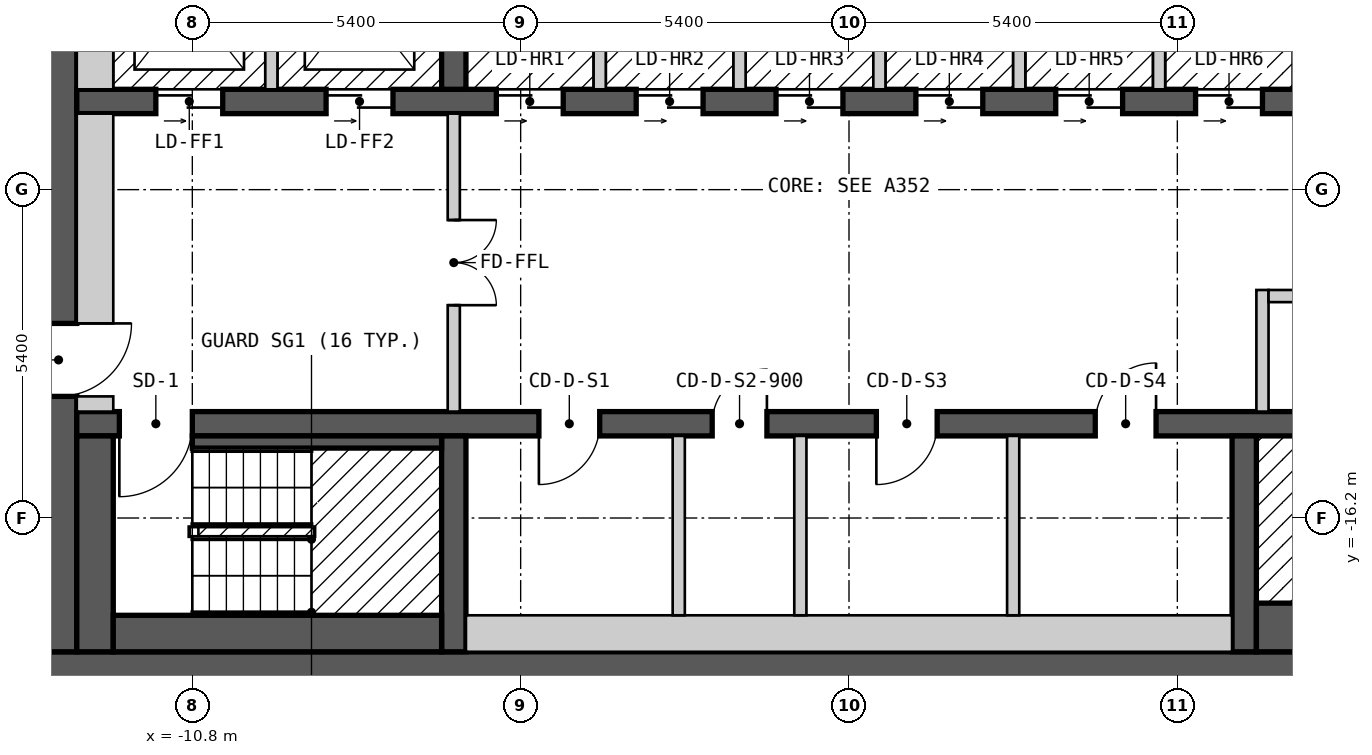
"""IFC4 building model, lengths in metres.
Left out: names, types, materials, properties, quantities, classifications, styles, units other than length and angle.
Written with IfcOpenShell. Run it as: python <this file> out.ifc"""

import sys

from ifc_helpers import new_model, si_unit, direction, frame, frame_2d, origin, place, context, subcontext, project, spatial, rectangle, extrude, element, fill, save


model = new_model("IFC4")
c1 = context("Model", 3, precision=1e-05, world=origin(), true_north=direction((0.0, 1.0)))
c2 = subcontext(c1, "Body", "Model", "MODEL_VIEW")
j1 = project(units=[si_unit("LENGTHUNIT", "METRE"), si_unit("PLANEANGLEUNIT", "RADIAN")], contexts=[c1])
p1 = place(None, origin())
s1 = spatial("IfcSite", under=j1, at=p1, CompositionType="ELEMENT")
p2 = place(p1, origin())
s2 = spatial("IfcBuilding", under=s1, at=p2, CompositionType="ELEMENT")
p3 = place(p2, frame((0.0, 0.0, 190.2)))
s3 = spatial("IfcBuildingStorey", under=s2, at=p3, CompositionType="ELEMENT", Elevation=190.2)
p4 = place(p3, frame((-13.3, -18.7, 0.0), z_axis=(0.0, 0.0, 1.0), x_axis=(1.0, 0.0, 0.0)))
e1 = element("IfcWall", 1, at=p4, inside=s3, PredefinedType="SHEAR", context=c2, shape_type="SweptSolid", body=[
    extrude(rectangle(XDim=26.6, YDim=0.6, at=frame_2d((13.3, 0.0))), origin(), (0.0, 0.0, 1.0), 2.7),
])
p5 = place(p3, frame((-13.0, -18.4, 0.0), z_axis=(0.0, 0.0, 1.0), x_axis=(0.0, 1.0, 0.0)))
e2 = element("IfcWall", 2, at=p5, inside=s3, PredefinedType="SHEAR", context=c2, shape_type="SweptSolid", body=[
    extrude(rectangle(XDim=12.8, YDim=0.6, at=frame_2d((6.4, 0.0))), origin(), (0.0, 0.0, 1.0), 2.7),
])
p6 = place(p5, frame((4.2, 0.0, 0.0)))
e3 = element("IfcOpeningElement", 3, at=p6, cuts=e2, PredefinedType="OPENING", context=c2, shape_type="SweptSolid", body=[
    extrude(rectangle(XDim=1.2, YDim=2.1, at=frame_2d((0.6, 1.05))), frame((0.0, 0.31, 0.0), z_axis=(0.0, -1.0, 0.0), x_axis=(1.0, 0.0, 0.0)), (0.0, 0.0, 1.0), 0.62),
])
p7 = place(p3, frame((-12.7, -14.65, 0.0), z_axis=(0.0, 0.0, 1.0), x_axis=(1.0, 0.0, 0.0)))
e4 = element("IfcWall", 4, at=p7, inside=s3, PredefinedType="SHEAR", context=c2, shape_type="SweptSolid", body=[
    extrude(rectangle(XDim=25.4, YDim=0.4, at=frame_2d((12.7, 0.0))), origin(), (0.0, 0.0, 1.0), 2.7),
])
p8 = place(p7, frame((1.9, 0.0, 0.0), z_axis=(0.0, 0.0, 1.0), x_axis=(-1.0, 0.0, 0.0)))
e5 = element("IfcOpeningElement", 5, at=p8, cuts=e4, PredefinedType="OPENING", context=c2, shape_type="SweptSolid", body=[
    extrude(rectangle(XDim=1.2, YDim=2.1, at=frame_2d((0.6, 1.05))), frame((0.0, 0.21, 0.0), z_axis=(0.0, -1.0, 0.0), x_axis=(1.0, 0.0, 0.0)), (0.0, 0.0, 1.0), 0.42),
])
p9 = place(p7, frame((24.75, 0.0, 0.0), z_axis=(0.0, 0.0, 1.0), x_axis=(-1.0, 0.0, 0.0)))
e6 = element("IfcOpeningElement", 6, at=p9, cuts=e4, PredefinedType="OPENING", context=c2, shape_type="SweptSolid", body=[
    extrude(rectangle(XDim=1.2, YDim=2.1, at=frame_2d((0.6, 1.05))), frame((0.0, 0.21, 0.0), z_axis=(0.0, -1.0, 0.0), x_axis=(1.0, 0.0, 0.0)), (0.0, 0.0, 1.0), 0.42),
])
p10 = place(p7, frame((8.6, 0.0, 0.0), z_axis=(0.0, 0.0, 1.0), x_axis=(-1.0, 0.0, 0.0)))
e7 = element("IfcOpeningElement", 7, at=p10, cuts=e4, PredefinedType="OPENING", context=c2, shape_type="SweptSolid", body=[
    extrude(rectangle(XDim=1.0, YDim=2.1, at=frame_2d((0.5, 1.05))), frame((0.0, 0.21, 0.0), z_axis=(0.0, -1.0, 0.0), x_axis=(1.0, 0.0, 0.0)), (0.0, 0.0, 1.0), 0.42),
])
p11 = place(p7, frame((11.35, 0.0, 0.0), z_axis=(0.0, 0.0, 1.0), x_axis=(-1.0, 0.0, 0.0)))
e8 = element("IfcOpeningElement", 8, at=p11, cuts=e4, PredefinedType="OPENING", context=c2, shape_type="SweptSolid", body=[
    extrude(rectangle(XDim=0.9, YDim=2.1, at=frame_2d((0.45, 1.05))), frame((0.0, 0.21, 0.0), z_axis=(0.0, -1.0, 0.0), x_axis=(1.0, 0.0, 0.0)), (0.0, 0.0, 1.0), 0.42),
])
p12 = place(p7, frame((14.15, 0.0, 0.0), z_axis=(0.0, 0.0, 1.0), x_axis=(-1.0, 0.0, 0.0)))
e9 = element("IfcOpeningElement", 9, at=p12, cuts=e4, PredefinedType="OPENING", context=c2, shape_type="SweptSolid", body=[
    extrude(rectangle(XDim=1.0, YDim=2.1, at=frame_2d((0.5, 1.05))), frame((0.0, 0.21, 0.0), z_axis=(0.0, -1.0, 0.0), x_axis=(1.0, 0.0, 0.0)), (0.0, 0.0, 1.0), 0.42),
])
p13 = place(p7, frame((17.75, 0.0, 0.0), z_axis=(0.0, 0.0, 1.0), x_axis=(-1.0, 0.0, 0.0)))
e10 = element("IfcOpeningElement", 10, at=p13, cuts=e4, PredefinedType="OPENING", context=c2, shape_type="SweptSolid", body=[
    extrude(rectangle(XDim=1.0, YDim=2.1, at=frame_2d((0.5, 1.05))), frame((0.0, 0.21, 0.0), z_axis=(0.0, -1.0, 0.0), x_axis=(1.0, 0.0, 0.0)), (0.0, 0.0, 1.0), 0.42),
])
p14 = place(p3, frame((-12.7, -9.35, 0.0), z_axis=(0.0, 0.0, 1.0), x_axis=(1.0, 0.0, 0.0)))
e11 = element("IfcWall", 11, at=p14, inside=s3, PredefinedType="SHEAR", context=c2, shape_type="SweptSolid", body=[
    extrude(rectangle(XDim=22.9, YDim=0.4, at=frame_2d((11.45, 0.0))), origin(), (0.0, 0.0, 1.0), 2.7),
])
p15 = place(p14, frame((1.3, 0.0, 0.0)))
e12 = element("IfcOpeningElement", 12, at=p15, cuts=e11, PredefinedType="OPENING", context=c2, shape_type="SweptSolid", body=[
    extrude(rectangle(XDim=1.1, YDim=2.1, at=frame_2d((0.55, 1.05))), frame((0.0, 0.21, 0.0), z_axis=(0.0, -1.0, 0.0), x_axis=(1.0, 0.0, 0.0)), (0.0, 0.0, 1.0), 0.42),
])
p16 = place(p14, frame((4.1, 0.0, 0.0)))
e13 = element("IfcOpeningElement", 13, at=p16, cuts=e11, PredefinedType="OPENING", context=c2, shape_type="SweptSolid", body=[
    extrude(rectangle(XDim=1.1, YDim=2.1, at=frame_2d((0.55, 1.05))), frame((0.0, 0.21, 0.0), z_axis=(0.0, -1.0, 0.0), x_axis=(1.0, 0.0, 0.0)), (0.0, 0.0, 1.0), 0.42),
])
p17 = place(p14, frame((6.9, 0.0, 0.0)))
e14 = element("IfcOpeningElement", 14, at=p17, cuts=e11, PredefinedType="OPENING", context=c2, shape_type="SweptSolid", body=[
    extrude(rectangle(XDim=1.1, YDim=2.1, at=frame_2d((0.55, 1.05))), frame((0.0, 0.21, 0.0), z_axis=(0.0, -1.0, 0.0), x_axis=(1.0, 0.0, 0.0)), (0.0, 0.0, 1.0), 0.42),
])
p18 = place(p14, frame((9.2, 0.0, 0.0)))
e15 = element("IfcOpeningElement", 15, at=p18, cuts=e11, PredefinedType="OPENING", context=c2, shape_type="SweptSolid", body=[
    extrude(rectangle(XDim=1.1, YDim=2.1, at=frame_2d((0.55, 1.05))), frame((0.0, 0.21, 0.0), z_axis=(0.0, -1.0, 0.0), x_axis=(1.0, 0.0, 0.0)), (0.0, 0.0, 1.0), 0.42),
])
p19 = place(p14, frame((11.5, 0.0, 0.0)))
e16 = element("IfcOpeningElement", 16, at=p19, cuts=e11, PredefinedType="OPENING", context=c2, shape_type="SweptSolid", body=[
    extrude(rectangle(XDim=1.1, YDim=2.1, at=frame_2d((0.55, 1.05))), frame((0.0, 0.21, 0.0), z_axis=(0.0, -1.0, 0.0), x_axis=(1.0, 0.0, 0.0)), (0.0, 0.0, 1.0), 0.42),
])
p20 = place(p14, frame((13.8, 0.0, 0.0)))
e17 = element("IfcOpeningElement", 17, at=p20, cuts=e11, PredefinedType="OPENING", context=c2, shape_type="SweptSolid", body=[
    extrude(rectangle(XDim=1.1, YDim=2.1, at=frame_2d((0.55, 1.05))), frame((0.0, 0.21, 0.0), z_axis=(0.0, -1.0, 0.0), x_axis=(1.0, 0.0, 0.0)), (0.0, 0.0, 1.0), 0.42),
])
p21 = place(p14, frame((16.1, 0.0, 0.0)))
e18 = element("IfcOpeningElement", 18, at=p21, cuts=e11, PredefinedType="OPENING", context=c2, shape_type="SweptSolid", body=[
    extrude(rectangle(XDim=1.1, YDim=2.1, at=frame_2d((0.55, 1.05))), frame((0.0, 0.21, 0.0), z_axis=(0.0, -1.0, 0.0), x_axis=(1.0, 0.0, 0.0)), (0.0, 0.0, 1.0), 0.42),
])
p22 = place(p14, frame((18.4, 0.0, 0.0)))
e19 = element("IfcOpeningElement", 19, at=p22, cuts=e11, PredefinedType="OPENING", context=c2, shape_type="SweptSolid", body=[
    extrude(rectangle(XDim=1.1, YDim=2.1, at=frame_2d((0.55, 1.05))), frame((0.0, 0.21, 0.0), z_axis=(0.0, -1.0, 0.0), x_axis=(1.0, 0.0, 0.0)), (0.0, 0.0, 1.0), 0.42),
])
p23 = place(p14, frame((20.8, 0.0, 0.0)))
e20 = element("IfcOpeningElement", 20, at=p23, cuts=e11, PredefinedType="OPENING", context=c2, shape_type="SweptSolid", body=[
    extrude(rectangle(XDim=1.1, YDim=2.1, at=frame_2d((0.55, 1.05))), frame((0.0, 0.21, 0.0), z_axis=(0.0, -1.0, 0.0), x_axis=(1.0, 0.0, 0.0)), (0.0, 0.0, 1.0), 0.42),
])
for number, where, z_axis, x_axis in (
    (21, (-6.5, -18.4, 0.0), (0.0, 0.0, 1.0), (0.0, 1.0, 0.0)),
    (22, (6.5, -18.4, 0.0), (0.0, 0.0, 1.0), (0.0, 1.0, 0.0)),
    (23, (-6.5, -9.15, 0.0), (0.0, 0.0, 1.0), (0.0, 1.0, 0.0)),
):
    element("IfcWall", number, at=place(p3, frame(where, z_axis=z_axis, x_axis=x_axis)), inside=s3, PredefinedType="SHEAR", context=c2, shape_type="SweptSolid", body=[
        extrude(rectangle(XDim=3.55, YDim=0.4, at=frame_2d((1.775, 0.0))), origin(), (0.0, 0.0, 1.0), 2.7),
    ])
p24 = place(p3, frame((-12.4, -18.4, 0.0), z_axis=(0.0, 0.0, 1.0), x_axis=(0.0, 1.0, 0.0)))
e24 = element("IfcWall", 24, at=p24, inside=s3, PredefinedType="SOLIDWALL", context=c2, shape_type="SweptSolid", body=[
    extrude(rectangle(XDim=3.55, YDim=0.6, at=frame_2d((1.775, 0.0))), origin(), (0.0, 0.0, 1.0), 2.7),
])
p25 = place(p3, frame((-12.7, -14.325, 0.0), z_axis=(0.0, 0.0, 1.0), x_axis=(1.0, 0.0, 0.0)))
e25 = element("IfcWall", 25, at=p25, inside=s3, PredefinedType="PARTITIONING", context=c2, shape_type="SweptSolid", body=[
    extrude(rectangle(XDim=0.6, YDim=0.25, at=frame_2d((0.3, 0.0))), origin(), (0.0, 0.0, 1.0), 2.7),
])
p26 = place(p3, frame((-12.4, -13.0, 0.0), z_axis=(0.0, 0.0, 1.0), x_axis=(0.0, 1.0, 0.0)))
e26 = element("IfcWall", 26, at=p26, inside=s3, PredefinedType="PARTITIONING", context=c2, shape_type="SweptSolid", body=[
    extrude(rectangle(XDim=3.45, YDim=0.6, at=frame_2d((1.725, 0.0))), origin(), (0.0, 0.0, 1.0), 2.7),
])
p27 = place(p3, frame((-12.4, -9.15, 0.0), z_axis=(0.0, 0.0, 1.0), x_axis=(0.0, 1.0, 0.0)))
e27 = element("IfcWall", 27, at=p27, inside=s3, PredefinedType="SOLIDWALL", context=c2, shape_type="SweptSolid", body=[
    extrude(rectangle(XDim=3.55, YDim=0.6, at=frame_2d((1.775, 0.0))), origin(), (0.0, 0.0, 1.0), 2.7),
])
p28 = place(p3, frame((-12.1, -18.1, 0.0), z_axis=(0.0, 0.0, 1.0), x_axis=(1.0, 0.0, 0.0)))
e28 = element("IfcWall", 28, at=p28, inside=s3, PredefinedType="SOLIDWALL", context=c2, shape_type="SweptSolid", body=[
    extrude(rectangle(XDim=5.4, YDim=0.6, at=frame_2d((2.7, 0.0))), origin(), (0.0, 0.0, 1.0), 2.7),
])
p29 = place(p3, frame((-10.8, -14.95, 0.0), z_axis=(0.0, 0.0, 1.0), x_axis=(1.0, 0.0, 0.0)))
e29 = element("IfcWall", 29, at=p29, inside=s3, PredefinedType="SOLIDWALL", context=c2, shape_type="SweptSolid", body=[
    extrude(rectangle(XDim=4.1, YDim=0.2, at=frame_2d((2.05, 0.0))), origin(), (0.0, 0.0, 1.0), 2.7),
])
p30 = place(p3, frame((-9.5, -9.15, 0.0), z_axis=(0.0, 0.0, 1.0), x_axis=(0.0, 1.0, 0.0)))
e30 = element("IfcWall", 30, at=p30, inside=s3, PredefinedType="SOLIDWALL", context=c2, shape_type="SweptSolid", body=[
    extrude(rectangle(XDim=2.95, YDim=0.2, at=frame_2d((1.475, 0.0))), origin(), (0.0, 0.0, 1.0), 2.7),
])
p31 = place(p3, frame((-6.5, -14.45, 0.0), z_axis=(0.0, 0.0, 1.0), x_axis=(0.0, 1.0, 0.0)))
e31 = element("IfcWall", 31, at=p31, inside=s3, PredefinedType="PARTITIONING", context=c2, shape_type="SweptSolid", body=[
    extrude(rectangle(XDim=4.9, YDim=0.2, at=frame_2d((2.45, 0.0))), origin(), (0.0, 0.0, 1.0), 2.7),
])
p32 = place(p31, frame((3.15, 0.0, 0.0), z_axis=(0.0, 0.0, 1.0), x_axis=(-1.0, 0.0, 0.0)))
e32 = element("IfcOpeningElement", 32, at=p32, cuts=e31, PredefinedType="OPENING", context=c2, shape_type="SweptSolid", body=[
    extrude(rectangle(XDim=1.4, YDim=2.1, at=frame_2d((0.7, 1.05))), frame((0.0, 0.11, 0.0), z_axis=(0.0, -1.0, 0.0), x_axis=(1.0, 0.0, 0.0)), (0.0, 0.0, 1.0), 0.22),
])
p33 = place(p3, frame((-6.3, -18.1, 0.0), z_axis=(0.0, 0.0, 1.0), x_axis=(1.0, 0.0, 0.0)))
e33 = element("IfcWall", 33, at=p33, inside=s3, PredefinedType="PARTITIONING", context=c2, shape_type="SweptSolid", body=[
    extrude(rectangle(XDim=12.6, YDim=0.6, at=frame_2d((6.3, 0.0))), origin(), (0.0, 0.0, 1.0), 2.7),
])
p34 = place(p3, frame((-4.1, -9.15, 0.0), z_axis=(0.0, 0.0, 1.0), x_axis=(0.0, 1.0, 0.0)))
e34 = element("IfcWall", 34, at=p34, inside=s3, PredefinedType="SOLIDWALL", context=c2, shape_type="SweptSolid", body=[
    extrude(rectangle(XDim=2.95, YDim=0.2, at=frame_2d((1.475, 0.0))), origin(), (0.0, 0.0, 1.0), 2.7),
])
p35 = place(p3, frame((-2.8, -17.8, 0.0), z_axis=(0.0, 0.0, 1.0), x_axis=(0.0, 1.0, 0.0)))
e35 = element("IfcWall", 35, at=p35, inside=s3, PredefinedType="PARTITIONING", context=c2, shape_type="SweptSolid", body=[
    extrude(rectangle(XDim=2.95, YDim=0.2, at=frame_2d((1.475, 0.0))), origin(), (0.0, 0.0, 1.0), 2.7),
])
p36 = place(p3, frame((-1.8, -9.15, 0.0), z_axis=(0.0, 0.0, 1.0), x_axis=(0.0, 1.0, 0.0)))
e36 = element("IfcWall", 36, at=p36, inside=s3, PredefinedType="SOLIDWALL", context=c2, shape_type="SweptSolid", body=[
    extrude(rectangle(XDim=2.95, YDim=0.2, at=frame_2d((1.475, 0.0))), origin(), (0.0, 0.0, 1.0), 2.7),
])
p37 = place(p3, frame((-0.8, -17.8, 0.0), z_axis=(0.0, 0.0, 1.0), x_axis=(0.0, 1.0, 0.0)))
e37 = element("IfcWall", 37, at=p37, inside=s3, PredefinedType="PARTITIONING", context=c2, shape_type="SweptSolid", body=[
    extrude(rectangle(XDim=2.95, YDim=0.2, at=frame_2d((1.475, 0.0))), origin(), (0.0, 0.0, 1.0), 2.7),
])
p38 = place(p3, frame((0.5, -9.15, 0.0), z_axis=(0.0, 0.0, 1.0), x_axis=(0.0, 1.0, 0.0)))
e38 = element("IfcWall", 38, at=p38, inside=s3, PredefinedType="SOLIDWALL", context=c2, shape_type="SweptSolid", body=[
    extrude(rectangle(XDim=2.95, YDim=0.2, at=frame_2d((1.475, 0.0))), origin(), (0.0, 0.0, 1.0), 2.7),
])
p39 = place(p3, frame((2.7, -17.8, 0.0), z_axis=(0.0, 0.0, 1.0), x_axis=(0.0, 1.0, 0.0)))
e39 = element("IfcWall", 39, at=p39, inside=s3, PredefinedType="PARTITIONING", context=c2, shape_type="SweptSolid", body=[
    extrude(rectangle(XDim=2.95, YDim=0.2, at=frame_2d((1.475, 0.0))), origin(), (0.0, 0.0, 1.0), 2.7),
])
for number, where, z_axis, x_axis in (
    (40, (2.8, -9.15, 0.0), (0.0, 0.0, 1.0), (0.0, 1.0, 0.0)),
    (41, (5.1, -9.15, 0.0), (0.0, 0.0, 1.0), (0.0, 1.0, 0.0)),
):
    element("IfcWall", number, at=place(p3, frame(where, z_axis=z_axis, x_axis=x_axis)), inside=s3, PredefinedType="SOLIDWALL", context=c2, shape_type="SweptSolid", body=[
        extrude(rectangle(XDim=2.95, YDim=0.2, at=frame_2d((1.475, 0.0))), origin(), (0.0, 0.0, 1.0), 2.7),
    ])
p40 = place(p3, frame((6.7, -18.0, 0.0), z_axis=(0.0, 0.0, 1.0), x_axis=(1.0, 0.0, 0.0)))
e42 = element("IfcWall", 42, at=p40, inside=s3, PredefinedType="SOLIDWALL", context=c2, shape_type="SweptSolid", body=[
    extrude(rectangle(XDim=6.0, YDim=0.8, at=frame_2d((3.0, 0.0))), origin(), (0.0, 0.0, 1.0), 2.7),
])
p41 = place(p3, frame((6.8, -14.45, 0.0), z_axis=(0.0, 0.0, 1.0), x_axis=(0.0, 1.0, 0.0)))
e43 = element("IfcWall", 43, at=p41, inside=s3, PredefinedType="PARTITIONING", context=c2, shape_type="SweptSolid", body=[
    extrude(rectangle(XDim=2.0, YDim=0.2, at=frame_2d((1.0, 0.0))), origin(), (0.0, 0.0, 1.0), 2.7),
])
p42 = place(p3, frame((6.9, -12.55, 0.0), z_axis=(0.0, 0.0, 1.0), x_axis=(1.0, 0.0, 0.0)))
e44 = element("IfcWall", 44, at=p42, inside=s3, PredefinedType="PARTITIONING", context=c2, shape_type="SweptSolid", body=[
    extrude(rectangle(XDim=3.3, YDim=0.2, at=frame_2d((1.65, 0.0))), origin(), (0.0, 0.0, 1.0), 2.7),
])
p43 = place(p42, frame((2.05, 0.0, 0.0), z_axis=(0.0, 0.0, 1.0), x_axis=(-1.0, 0.0, 0.0)))
e45 = element("IfcOpeningElement", 45, at=p43, cuts=e44, PredefinedType="OPENING", context=c2, shape_type="SweptSolid", body=[
    extrude(rectangle(XDim=1.0, YDim=2.1, at=frame_2d((0.5, 1.05))), frame((0.0, 0.11, 0.0), z_axis=(0.0, -1.0, 0.0), x_axis=(1.0, 0.0, 0.0)), (0.0, 0.0, 1.0), 0.22),
])
p44 = place(p3, frame((7.4, -9.15, 0.0), z_axis=(0.0, 0.0, 1.0), x_axis=(0.0, 1.0, 0.0)))
e46 = element("IfcWall", 46, at=p44, inside=s3, PredefinedType="SOLIDWALL", context=c2, shape_type="SweptSolid", body=[
    extrude(rectangle(XDim=2.95, YDim=0.2, at=frame_2d((1.475, 0.0))), origin(), (0.0, 0.0, 1.0), 2.7),
])
p45 = place(p15, origin())
e47 = element("IfcDoor", 47, at=p45, inside=s3, OperationType="DOUBLE_DOOR_SLIDING", PredefinedType="DOOR", context=c2, shape_type="SweptSolid", body=[
    extrude(rectangle(XDim=1.1, YDim=2.1, at=frame_2d((0.55, 1.05))), frame((0.0, 0.025, 0.0), z_axis=(0.0, -1.0, 0.0), x_axis=(1.0, 0.0, 0.0)), (0.0, 0.0, 1.0), 0.05),
])
fill(e12, e47)
p46 = place(p16, origin())
e48 = element("IfcDoor", 48, at=p46, inside=s3, OperationType="DOUBLE_DOOR_SLIDING", PredefinedType="DOOR", context=c2, shape_type="SweptSolid", body=[
    extrude(rectangle(XDim=1.1, YDim=2.1, at=frame_2d((0.55, 1.05))), frame((0.0, 0.025, 0.0), z_axis=(0.0, -1.0, 0.0), x_axis=(1.0, 0.0, 0.0)), (0.0, 0.0, 1.0), 0.05),
])
fill(e13, e48)
p47 = place(p17, origin())
e49 = element("IfcDoor", 49, at=p47, inside=s3, OperationType="DOUBLE_DOOR_SLIDING", PredefinedType="DOOR", context=c2, shape_type="SweptSolid", body=[
    extrude(rectangle(XDim=1.1, YDim=2.1, at=frame_2d((0.55, 1.05))), frame((0.0, 0.025, 0.0), z_axis=(0.0, -1.0, 0.0), x_axis=(1.0, 0.0, 0.0)), (0.0, 0.0, 1.0), 0.05),
])
fill(e14, e49)
p48 = place(p18, origin())
e50 = element("IfcDoor", 50, at=p48, inside=s3, OperationType="DOUBLE_DOOR_SLIDING", PredefinedType="DOOR", context=c2, shape_type="SweptSolid", body=[
    extrude(rectangle(XDim=1.1, YDim=2.1, at=frame_2d((0.55, 1.05))), frame((0.0, 0.025, 0.0), z_axis=(0.0, -1.0, 0.0), x_axis=(1.0, 0.0, 0.0)), (0.0, 0.0, 1.0), 0.05),
])
fill(e15, e50)
p49 = place(p19, origin())
e51 = element("IfcDoor", 51, at=p49, inside=s3, OperationType="DOUBLE_DOOR_SLIDING", PredefinedType="DOOR", context=c2, shape_type="SweptSolid", body=[
    extrude(rectangle(XDim=1.1, YDim=2.1, at=frame_2d((0.55, 1.05))), frame((0.0, 0.025, 0.0), z_axis=(0.0, -1.0, 0.0), x_axis=(1.0, 0.0, 0.0)), (0.0, 0.0, 1.0), 0.05),
])
fill(e16, e51)
p50 = place(p20, origin())
e52 = element("IfcDoor", 52, at=p50, inside=s3, OperationType="DOUBLE_DOOR_SLIDING", PredefinedType="DOOR", context=c2, shape_type="SweptSolid", body=[
    extrude(rectangle(XDim=1.1, YDim=2.1, at=frame_2d((0.55, 1.05))), frame((0.0, 0.025, 0.0), z_axis=(0.0, -1.0, 0.0), x_axis=(1.0, 0.0, 0.0)), (0.0, 0.0, 1.0), 0.05),
])
fill(e17, e52)
p51 = place(p21, origin())
e53 = element("IfcDoor", 53, at=p51, inside=s3, OperationType="DOUBLE_DOOR_SLIDING", PredefinedType="DOOR", context=c2, shape_type="SweptSolid", body=[
    extrude(rectangle(XDim=1.1, YDim=2.1, at=frame_2d((0.55, 1.05))), frame((0.0, 0.025, 0.0), z_axis=(0.0, -1.0, 0.0), x_axis=(1.0, 0.0, 0.0)), (0.0, 0.0, 1.0), 0.05),
])
fill(e18, e53)
p52 = place(p22, origin())
e54 = element("IfcDoor", 54, at=p52, inside=s3, OperationType="DOUBLE_DOOR_SLIDING", PredefinedType="DOOR", context=c2, shape_type="SweptSolid", body=[
    extrude(rectangle(XDim=1.1, YDim=2.1, at=frame_2d((0.55, 1.05))), frame((0.0, 0.025, 0.0), z_axis=(0.0, -1.0, 0.0), x_axis=(1.0, 0.0, 0.0)), (0.0, 0.0, 1.0), 0.05),
])
fill(e19, e54)
p53 = place(p8, origin())
e55 = element("IfcDoor", 55, at=p53, inside=s3, OperationType="SINGLE_SWING_RIGHT", PredefinedType="DOOR", context=c2, shape_type="SweptSolid", body=[
    extrude(rectangle(XDim=1.2, YDim=2.1, at=frame_2d((0.6, 1.05))), frame((0.0, 0.025, 0.0), z_axis=(0.0, -1.0, 0.0), x_axis=(1.0, 0.0, 0.0)), (0.0, 0.0, 1.0), 0.05),
])
fill(e5, e55)
p54 = place(p6, origin())
e56 = element("IfcDoor", 56, at=p54, inside=s3, OperationType="SINGLE_SWING_RIGHT", PredefinedType="DOOR", context=c2, shape_type="SweptSolid", body=[
    extrude(rectangle(XDim=1.2, YDim=2.1, at=frame_2d((0.6, 1.05))), frame((0.0, 0.025, 0.0), z_axis=(0.0, -1.0, 0.0), x_axis=(1.0, 0.0, 0.0)), (0.0, 0.0, 1.0), 0.05),
])
fill(e3, e56)
p55 = place(p32, origin())
e57 = element("IfcDoor", 57, at=p55, inside=s3, OperationType="DOUBLE_DOOR_SINGLE_SWING", PredefinedType="DOOR", context=c2, shape_type="SweptSolid", body=[
    extrude(rectangle(XDim=1.4, YDim=2.1, at=frame_2d((0.7, 1.05))), frame((0.0, 0.025, 0.0), z_axis=(0.0, -1.0, 0.0), x_axis=(1.0, 0.0, 0.0)), (0.0, 0.0, 1.0), 0.05),
])
fill(e32, e57)
p56 = place(p10, origin())
e58 = element("IfcDoor", 58, at=p56, inside=s3, OperationType="SINGLE_SWING_RIGHT", PredefinedType="DOOR", context=c2, shape_type="SweptSolid", body=[
    extrude(rectangle(XDim=1.0, YDim=2.1, at=frame_2d((0.5, 1.05))), frame((0.0, 0.025, 0.0), z_axis=(0.0, -1.0, 0.0), x_axis=(1.0, 0.0, 0.0)), (0.0, 0.0, 1.0), 0.05),
])
fill(e7, e58)
p57 = place(p11, origin())
e59 = element("IfcDoor", 59, at=p57, inside=s3, OperationType="SINGLE_SWING_LEFT", PredefinedType="DOOR", context=c2, shape_type="SweptSolid", body=[
    extrude(rectangle(XDim=0.9, YDim=2.1, at=frame_2d((0.45, 1.05))), frame((0.0, 0.025, 0.0), z_axis=(0.0, -1.0, 0.0), x_axis=(1.0, 0.0, 0.0)), (0.0, 0.0, 1.0), 0.05),
])
fill(e8, e59)
p58 = place(p12, origin())
e60 = element("IfcDoor", 60, at=p58, inside=s3, OperationType="SINGLE_SWING_RIGHT", PredefinedType="DOOR", context=c2, shape_type="SweptSolid", body=[
    extrude(rectangle(XDim=1.0, YDim=2.1, at=frame_2d((0.5, 1.05))), frame((0.0, 0.025, 0.0), z_axis=(0.0, -1.0, 0.0), x_axis=(1.0, 0.0, 0.0)), (0.0, 0.0, 1.0), 0.05),
])
fill(e9, e60)
p59 = place(p13, origin())
e61 = element("IfcDoor", 61, at=p59, inside=s3, OperationType="SINGLE_SWING_LEFT", PredefinedType="DOOR", context=c2, shape_type="SweptSolid", body=[
    extrude(rectangle(XDim=1.0, YDim=2.1, at=frame_2d((0.5, 1.05))), frame((0.0, 0.025, 0.0), z_axis=(0.0, -1.0, 0.0), x_axis=(1.0, 0.0, 0.0)), (0.0, 0.0, 1.0), 0.05),
])
fill(e10, e61)
save(model, sys.argv[1])
